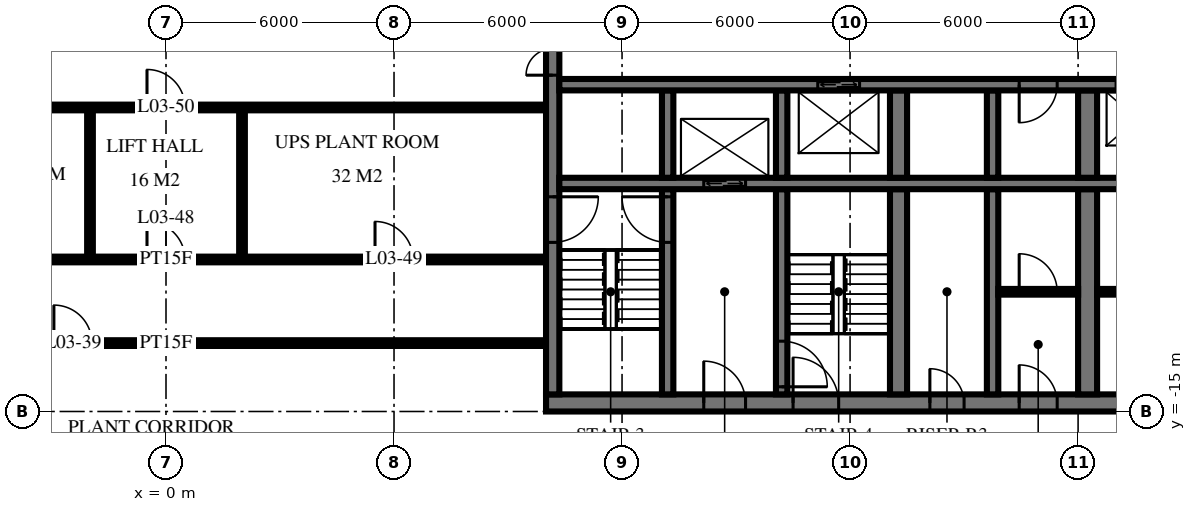
"""IFC4 building model, lengths in metres.
Left out: names, types, materials, properties, quantities, classifications, styles, units other than length and angle.
Written with IfcOpenShell. Run it as: python <this file> out.ifc"""

import sys

from ifc_helpers import new_model, si_unit, direction, frame, frame_2d, origin, place, context, subcontext, project, spatial, rectangle, extrude, element, fill, save


model = new_model("IFC4")
c1 = context("Model", 3, precision=1e-05, world=origin(), true_north=direction((0.0, 1.0)))
c2 = subcontext(c1, "Body", "Model", "MODEL_VIEW")
j1 = project(units=[si_unit("LENGTHUNIT", "METRE"), si_unit("PLANEANGLEUNIT", "RADIAN")], contexts=[c1])
p1 = place(None, origin())
s1 = spatial("IfcSite", under=j1, at=p1, CompositionType="ELEMENT")
p2 = place(p1, origin())
s2 = spatial("IfcBuilding", under=s1, at=p2, CompositionType="ELEMENT")
p3 = place(p2, frame((0.0, 0.0, 18.0)))
s3 = spatial("IfcBuildingStorey", under=s2, at=p3, CompositionType="ELEMENT", Elevation=18.0)
p4 = place(p3, frame((10.0, -14.775, 0.0), z_axis=(0.0, 0.0, 1.0), x_axis=(1.0, 0.0, 0.0)))
e1 = element("IfcWall", 1, at=p4, inside=s3, PredefinedType="SHEAR", context=c2, shape_type="SweptSolid", body=[
    extrude(rectangle(XDim=19.5, YDim=0.45, at=frame_2d((9.75, 0.0))), origin(), (0.0, 0.0, 1.0), 6.0),
])
p5 = place(p4, frame((6.5, 0.0, 0.0)))
e2 = element("IfcOpeningElement", 2, at=p5, cuts=e1, PredefinedType="OPENING", context=c2, shape_type="SweptSolid", body=[
    extrude(rectangle(XDim=1.2, YDim=2.1, at=frame_2d((0.6, 1.05))), frame((0.0, 0.235, 0.0), z_axis=(0.0, -1.0, 0.0), x_axis=(1.0, 0.0, 0.0)), (0.0, 0.0, 1.0), 0.47),
])
p6 = place(p4, frame((4.15, 0.0, 0.0)))
e3 = element("IfcOpeningElement", 3, at=p6, cuts=e1, PredefinedType="OPENING", context=c2, shape_type="SweptSolid", body=[
    extrude(rectangle(XDim=1.1, YDim=2.1, at=frame_2d((0.55, 1.05))), frame((0.0, 0.235, 0.0), z_axis=(0.0, -1.0, 0.0), x_axis=(1.0, 0.0, 0.0)), (0.0, 0.0, 1.0), 0.47),
])
p7 = place(p4, frame((10.1, 0.0, 0.0)))
e4 = element("IfcOpeningElement", 4, at=p7, cuts=e1, PredefinedType="OPENING", context=c2, shape_type="SweptSolid", body=[
    extrude(rectangle(XDim=0.9, YDim=2.1, at=frame_2d((0.45, 1.05))), frame((0.0, 0.235, 0.0), z_axis=(0.0, -1.0, 0.0), x_axis=(1.0, 0.0, 0.0)), (0.0, 0.0, 1.0), 0.47),
])
p8 = place(p4, frame((12.45, 0.0, 0.0)))
e5 = element("IfcOpeningElement", 5, at=p8, cuts=e1, PredefinedType="OPENING", context=c2, shape_type="SweptSolid", body=[
    extrude(rectangle(XDim=1.0, YDim=2.1, at=frame_2d((0.5, 1.05))), frame((0.0, 0.235, 0.0), z_axis=(0.0, -1.0, 0.0), x_axis=(1.0, 0.0, 0.0)), (0.0, 0.0, 1.0), 0.47),
])
p9 = place(p4, frame((16.25, 0.0, 0.0)))
e6 = element("IfcOpeningElement", 6, at=p9, cuts=e1, PredefinedType="OPENING", context=c2, shape_type="SweptSolid", body=[
    extrude(rectangle(XDim=1.0, YDim=2.1, at=frame_2d((0.5, 1.05))), frame((0.0, 0.235, 0.0), z_axis=(0.0, -1.0, 0.0), x_axis=(1.0, 0.0, 0.0)), (0.0, 0.0, 1.0), 0.47),
])
p10 = place(p3, frame((10.175, -14.55, 0.0), z_axis=(0.0, 0.0, 1.0), x_axis=(0.0, 1.0, 0.0)))
e7 = element("IfcWall", 7, at=p10, inside=s3, PredefinedType="SHEAR", context=c2, shape_type="SweptSolid", body=[
    extrude(rectangle(XDim=14.1, YDim=0.35, at=frame_2d((7.05, 0.0))), origin(), (0.0, 0.0, 1.0), 6.0),
])
p11 = place(p10, frame((8.4, 0.0, 0.0)))
e8 = element("IfcOpeningElement", 8, at=p11, cuts=e7, PredefinedType="OPENING", context=c2, shape_type="SweptSolid", body=[
    extrude(rectangle(XDim=1.4, YDim=2.4, at=frame_2d((0.7, 1.2))), frame((0.0, 0.185, 0.0), z_axis=(0.0, -1.0, 0.0), x_axis=(1.0, 0.0, 0.0)), (0.0, 0.0, 1.0), 0.37),
])
p12 = place(p10, frame((10.0, 0.0, 0.0)))
e9 = element("IfcOpeningElement", 9, at=p12, cuts=e7, PredefinedType="OPENING", context=c2, shape_type="SweptSolid", body=[
    extrude(rectangle(XDim=1.4, YDim=2.4, at=frame_2d((0.7, 1.2))), frame((0.0, 0.185, 0.0), z_axis=(0.0, -1.0, 0.0), x_axis=(1.0, 0.0, 0.0)), (0.0, 0.0, 1.0), 0.37),
])
p13 = place(p10, frame((4.0, 0.0, 0.0)))
e10 = element("IfcOpeningElement", 10, at=p13, cuts=e7, PredefinedType="OPENING", context=c2, shape_type="SweptSolid", body=[
    extrude(rectangle(XDim=1.2, YDim=2.1, at=frame_2d((0.6, 1.05))), frame((0.0, 0.185, 0.0), z_axis=(0.0, -1.0, 0.0), x_axis=(1.0, 0.0, 0.0)), (0.0, 0.0, 1.0), 0.37),
])
p14 = place(p3, frame((10.35, -6.4, 0.0), z_axis=(0.0, 0.0, 1.0), x_axis=(1.0, 0.0, 0.0)))
e11 = element("IfcWall", 11, at=p14, inside=s3, PredefinedType="SHEAR", context=c2, shape_type="SweptSolid", body=[
    extrude(rectangle(XDim=18.7, YDim=0.3, at=frame_2d((9.35, 0.0))), origin(), (0.0, 0.0, 1.0), 6.0),
])
p15 = place(p14, frame((14.65, 0.0, 0.0)))
e12 = element("IfcOpeningElement", 12, at=p15, cuts=e11, PredefinedType="OPENING", context=c2, shape_type="SweptSolid", body=[
    extrude(rectangle(XDim=1.1, YDim=2.1, at=frame_2d((0.55, 1.05))), frame((0.0, 0.16, 0.0), z_axis=(0.0, -1.0, 0.0), x_axis=(1.0, 0.0, 0.0)), (0.0, 0.0, 1.0), 0.32),
])
p16 = place(p14, frame((17.05, 0.0, 0.0)))
e13 = element("IfcOpeningElement", 13, at=p16, cuts=e11, PredefinedType="OPENING", context=c2, shape_type="SweptSolid", body=[
    extrude(rectangle(XDim=1.1, YDim=2.1, at=frame_2d((0.55, 1.05))), frame((0.0, 0.16, 0.0), z_axis=(0.0, -1.0, 0.0), x_axis=(1.0, 0.0, 0.0)), (0.0, 0.0, 1.0), 0.32),
])
p17 = place(p14, frame((6.8, 0.0, 0.0)))
e14 = element("IfcOpeningElement", 14, at=p17, cuts=e11, PredefinedType="OPENING", context=c2, shape_type="SweptSolid", body=[
    extrude(rectangle(XDim=1.1, YDim=2.1, at=frame_2d((0.55, 1.05))), frame((0.0, 0.16, 0.0), z_axis=(0.0, -1.0, 0.0), x_axis=(1.0, 0.0, 0.0)), (0.0, 0.0, 1.0), 0.32),
])
p18 = place(p14, frame((12.1, 0.0, 0.0)))
e15 = element("IfcOpeningElement", 15, at=p18, cuts=e11, PredefinedType="OPENING", context=c2, shape_type="SweptSolid", body=[
    extrude(rectangle(XDim=1.0, YDim=2.1, at=frame_2d((0.5, 1.05))), frame((0.0, 0.16, 0.0), z_axis=(0.0, -1.0, 0.0), x_axis=(1.0, 0.0, 0.0)), (0.0, 0.0, 1.0), 0.32),
])
p19 = place(p3, frame((10.35, -9.0, 0.0), z_axis=(0.0, 0.0, 1.0), x_axis=(1.0, 0.0, 0.0)))
e16 = element("IfcWall", 16, at=p19, inside=s3, PredefinedType="SHEAR", context=c2, shape_type="SweptSolid", body=[
    extrude(rectangle(XDim=18.7, YDim=0.3, at=frame_2d((9.35, 0.0))), origin(), (0.0, 0.0, 1.0), 6.0),
])
p20 = place(p19, frame((3.8, 0.0, 0.0)))
e17 = element("IfcOpeningElement", 17, at=p20, cuts=e16, PredefinedType="OPENING", context=c2, shape_type="SweptSolid", body=[
    extrude(rectangle(XDim=1.1, YDim=2.1, at=frame_2d((0.55, 1.05))), frame((0.0, 0.16, 0.0), z_axis=(0.0, -1.0, 0.0), x_axis=(1.0, 0.0, 0.0)), (0.0, 0.0, 1.0), 0.32),
])
p21 = place(p3, frame((13.2, -8.85, 0.0), z_axis=(0.0, 0.0, 1.0), x_axis=(0.0, 1.0, 0.0)))
e18 = element("IfcWall", 18, at=p21, inside=s3, PredefinedType="SHEAR", context=c2, shape_type="SweptSolid", body=[
    extrude(rectangle(XDim=2.3, YDim=0.3, at=frame_2d((1.15, 0.0))), origin(), (0.0, 0.0, 1.0), 6.0),
])
p22 = place(p3, frame((13.2, -14.55, 0.0), z_axis=(0.0, 0.0, 1.0), x_axis=(0.0, 1.0, 0.0)))
e19 = element("IfcWall", 19, at=p22, inside=s3, PredefinedType="SHEAR", context=c2, shape_type="SweptSolid", body=[
    extrude(rectangle(XDim=5.4, YDim=0.3, at=frame_2d((2.7, 0.0))), origin(), (0.0, 0.0, 1.0), 6.0),
])
p23 = place(p22, frame((4.0, 0.0, 0.0)))
e20 = element("IfcOpeningElement", 20, at=p23, cuts=e19, PredefinedType="OPENING", context=c2, shape_type="SweptSolid", body=[
    extrude(rectangle(XDim=1.2, YDim=2.1, at=frame_2d((0.6, 1.05))), frame((0.0, 0.16, 0.0), z_axis=(0.0, -1.0, 0.0), x_axis=(1.0, 0.0, 0.0)), (0.0, 0.0, 1.0), 0.32),
])
p24 = place(p3, frame((16.2, -8.85, 0.0), z_axis=(0.0, 0.0, 1.0), x_axis=(0.0, 1.0, 0.0)))
e21 = element("IfcWall", 21, at=p24, inside=s3, PredefinedType="SHEAR", context=c2, shape_type="SweptSolid", body=[
    extrude(rectangle(XDim=2.3, YDim=0.3, at=frame_2d((1.15, 0.0))), origin(), (0.0, 0.0, 1.0), 6.0),
])
p25 = place(p3, frame((16.2, -14.55, 0.0), z_axis=(0.0, 0.0, 1.0), x_axis=(0.0, 1.0, 0.0)))
e22 = element("IfcWall", 22, at=p25, inside=s3, PredefinedType="SHEAR", context=c2, shape_type="SweptSolid", body=[
    extrude(rectangle(XDim=5.4, YDim=0.3, at=frame_2d((2.7, 0.0))), origin(), (0.0, 0.0, 1.0), 6.0),
])
p26 = place(p25, frame((0.2, 0.0, 0.0)))
e23 = element("IfcOpeningElement", 23, at=p26, cuts=e22, PredefinedType="OPENING", context=c2, shape_type="SweptSolid", body=[
    extrude(rectangle(XDim=1.2, YDim=2.1, at=frame_2d((0.6, 1.05))), frame((0.0, 0.16, 0.0), z_axis=(0.0, -1.0, 0.0), x_axis=(1.0, 0.0, 0.0)), (0.0, 0.0, 1.0), 0.32),
])
p27 = place(p3, frame((19.275, -8.85, 0.0), z_axis=(0.0, 0.0, 1.0), x_axis=(0.0, 1.0, 0.0)))
e24 = element("IfcWall", 24, at=p27, inside=s3, PredefinedType="SHEAR", context=c2, shape_type="SweptSolid", body=[
    extrude(rectangle(XDim=2.3, YDim=0.45, at=frame_2d((1.15, 0.0))), origin(), (0.0, 0.0, 1.0), 6.0),
])
p28 = place(p3, frame((19.275, -14.55, 0.0), z_axis=(0.0, 0.0, 1.0), x_axis=(0.0, 1.0, 0.0)))
e25 = element("IfcWall", 25, at=p28, inside=s3, PredefinedType="SHEAR", context=c2, shape_type="SweptSolid", body=[
    extrude(rectangle(XDim=5.4, YDim=0.45, at=frame_2d((2.7, 0.0))), origin(), (0.0, 0.0, 1.0), 6.0),
])
p29 = place(p3, frame((21.75, -8.85, 0.0), z_axis=(0.0, 0.0, 1.0), x_axis=(0.0, 1.0, 0.0)))
e26 = element("IfcWall", 26, at=p29, inside=s3, PredefinedType="SHEAR", context=c2, shape_type="SweptSolid", body=[
    extrude(rectangle(XDim=2.3, YDim=0.3, at=frame_2d((1.15, 0.0))), origin(), (0.0, 0.0, 1.0), 6.0),
])
p30 = place(p3, frame((21.75, -14.55, 0.0), z_axis=(0.0, 0.0, 1.0), x_axis=(0.0, 1.0, 0.0)))
e27 = element("IfcWall", 27, at=p30, inside=s3, PredefinedType="SHEAR", context=c2, shape_type="SweptSolid", body=[
    extrude(rectangle(XDim=5.4, YDim=0.3, at=frame_2d((2.7, 0.0))), origin(), (0.0, 0.0, 1.0), 6.0),
])
p31 = place(p3, frame((24.25, -8.85, 0.0), z_axis=(0.0, 0.0, 1.0), x_axis=(0.0, 1.0, 0.0)))
e28 = element("IfcWall", 28, at=p31, inside=s3, PredefinedType="SHEAR", context=c2, shape_type="SweptSolid", body=[
    extrude(rectangle(XDim=2.3, YDim=0.5, at=frame_2d((1.15, 0.0))), origin(), (0.0, 0.0, 1.0), 6.0),
])
p32 = place(p3, frame((24.25, -14.55, 0.0), z_axis=(0.0, 0.0, 1.0), x_axis=(0.0, 1.0, 0.0)))
e29 = element("IfcWall", 29, at=p32, inside=s3, PredefinedType="SHEAR", context=c2, shape_type="SweptSolid", body=[
    extrude(rectangle(XDim=5.4, YDim=0.5, at=frame_2d((2.7, 0.0))), origin(), (0.0, 0.0, 1.0), 6.0),
])
p33 = place(p3, frame((21.9, -11.85, 0.0), z_axis=(0.0, 0.0, 1.0), x_axis=(1.0, 0.0, 0.0)))
e30 = element("IfcWall", 30, at=p33, inside=s3, PredefinedType="PARTITIONING", context=c2, shape_type="SweptSolid", body=[
    extrude(rectangle(XDim=2.1, YDim=0.15, at=frame_2d((1.05, 0.0))), origin(), (0.0, 0.0, 1.0), 5.7),
])
p34 = place(p33, frame((0.55, 0.0, 0.0)))
e31 = element("IfcOpeningElement", 31, at=p34, cuts=e30, PredefinedType="OPENING", context=c2, shape_type="SweptSolid", body=[
    extrude(rectangle(XDim=1.0, YDim=2.1, at=frame_2d((0.5, 1.05))), frame((0.0, 0.085, 0.0), z_axis=(0.0, -1.0, 0.0), x_axis=(1.0, 0.0, 0.0)), (0.0, 0.0, 1.0), 0.17),
])
p35 = place(p3, frame((24.5, -11.85, 0.0), z_axis=(0.0, 0.0, 1.0), x_axis=(1.0, 0.0, 0.0)))
e32 = element("IfcWall", 32, at=p35, inside=s3, PredefinedType="PARTITIONING", context=c2, shape_type="SweptSolid", body=[
    extrude(rectangle(XDim=4.5, YDim=0.15, at=frame_2d((2.25, 0.0))), origin(), (0.0, 0.0, 1.0), 5.7),
])
p36 = place(p35, frame((1.75, 0.0, 0.0)))
e33 = element("IfcOpeningElement", 33, at=p36, cuts=e32, PredefinedType="OPENING", context=c2, shape_type="SweptSolid", body=[
    extrude(rectangle(XDim=1.0, YDim=2.1, at=frame_2d((0.5, 1.05))), frame((0.0, 0.085, 0.0), z_axis=(0.0, -1.0, 0.0), x_axis=(1.0, 0.0, 0.0)), (0.0, 0.0, 1.0), 0.17),
])
for number, where, z_axis, x_axis in (
    (34, (2.0, -11.0, 0.0), (0.0, 0.0, 1.0), (0.0, 1.0, 0.0)),
    (35, (-2.0, -11.0, 0.0), (0.0, 0.0, 1.0), (0.0, 1.0, 0.0)),
):
    element("IfcWall", number, at=place(p3, frame(where, z_axis=z_axis, x_axis=x_axis)), inside=s3, PredefinedType="PARTITIONING", context=c2, shape_type="SweptSolid", body=[
        extrude(rectangle(XDim=4.0, YDim=0.15, at=frame_2d((2.0, 0.0))), origin(), (0.0, 0.0, 1.0), 5.55),
    ])
p37 = place(p3, frame((-9.95, -13.2, 0.0), z_axis=(0.0, 0.0, 1.0), x_axis=(1.0, 0.0, 0.0)))
e36 = element("IfcWall", 36, at=p37, inside=s3, PredefinedType="PARTITIONING", context=c2, shape_type="SweptSolid", body=[
    extrude(rectangle(XDim=19.9, YDim=0.15, at=frame_2d((9.95, 0.0))), origin(), (0.0, 0.0, 1.0), 5.55),
])
p38 = place(p37, frame((7.0, 0.0, 0.0)))
e37 = element("IfcOpeningElement", 37, at=p38, cuts=e36, PredefinedType="OPENING", context=c2, shape_type="SweptSolid", body=[
    extrude(rectangle(XDim=1.0, YDim=2.1, at=frame_2d((0.5, 1.05))), frame((0.0, 0.085, 0.0), z_axis=(0.0, -1.0, 0.0), x_axis=(1.0, 0.0, 0.0)), (0.0, 0.0, 1.0), 0.17),
])
p39 = place(p3, frame((-9.95, -11.0, 0.0), z_axis=(0.0, 0.0, 1.0), x_axis=(1.0, 0.0, 0.0)))
e38 = element("IfcWall", 38, at=p39, inside=s3, PredefinedType="PARTITIONING", context=c2, shape_type="SweptSolid", body=[
    extrude(rectangle(XDim=19.9, YDim=0.15, at=frame_2d((9.95, 0.0))), origin(), (0.0, 0.0, 1.0), 5.55),
])
p40 = place(p39, frame((9.45, 0.0, 0.0)))
e39 = element("IfcOpeningElement", 39, at=p40, cuts=e38, PredefinedType="OPENING", context=c2, shape_type="SweptSolid", body=[
    extrude(rectangle(XDim=1.0, YDim=2.1, at=frame_2d((0.5, 1.05))), frame((0.0, 0.085, 0.0), z_axis=(0.0, -1.0, 0.0), x_axis=(1.0, 0.0, 0.0)), (0.0, 0.0, 1.0), 0.17),
])
p41 = place(p39, frame((15.45, 0.0, 0.0)))
e40 = element("IfcOpeningElement", 40, at=p41, cuts=e38, PredefinedType="OPENING", context=c2, shape_type="SweptSolid", body=[
    extrude(rectangle(XDim=1.0, YDim=2.1, at=frame_2d((0.5, 1.05))), frame((0.0, 0.085, 0.0), z_axis=(0.0, -1.0, 0.0), x_axis=(1.0, 0.0, 0.0)), (0.0, 0.0, 1.0), 0.17),
])
p42 = place(p3, frame((-9.95, -7.0, 0.0), z_axis=(0.0, 0.0, 1.0), x_axis=(1.0, 0.0, 0.0)))
e41 = element("IfcWall", 41, at=p42, inside=s3, PredefinedType="PARTITIONING", context=c2, shape_type="SweptSolid", body=[
    extrude(rectangle(XDim=19.9, YDim=0.15, at=frame_2d((9.95, 0.0))), origin(), (0.0, 0.0, 1.0), 5.55),
])
p43 = place(p42, frame((9.45, 0.0, 0.0)))
e42 = element("IfcOpeningElement", 42, at=p43, cuts=e41, PredefinedType="OPENING", context=c2, shape_type="SweptSolid", body=[
    extrude(rectangle(XDim=1.0, YDim=2.1, at=frame_2d((0.5, 1.05))), frame((0.0, 0.085, 0.0), z_axis=(0.0, -1.0, 0.0), x_axis=(1.0, 0.0, 0.0)), (0.0, 0.0, 1.0), 0.17),
])
p44 = place(p42, frame((2.0, 0.0, 0.0)))
e43 = element("IfcOpeningElement", 43, at=p44, cuts=e41, PredefinedType="OPENING", context=c2, shape_type="SweptSolid", body=[
    extrude(rectangle(XDim=1.0, YDim=2.1, at=frame_2d((0.5, 1.05))), frame((0.0, 0.085, 0.0), z_axis=(0.0, -1.0, 0.0), x_axis=(1.0, 0.0, 0.0)), (0.0, 0.0, 1.0), 0.17),
])
p45 = place(p20, origin())
e44 = element("IfcDoor", 44, at=p45, inside=s3, OperationType="DOUBLE_DOOR_SLIDING", PredefinedType="USERDEFINED", context=c2, shape_type="SweptSolid", body=[
    extrude(rectangle(XDim=1.1, YDim=2.1, at=frame_2d((0.55, 1.05))), frame((0.0, 0.025, 0.0), z_axis=(0.0, -1.0, 0.0), x_axis=(1.0, 0.0, 0.0)), (0.0, 0.0, 1.0), 0.05),
])
fill(e17, e44)
p46 = place(p17, origin())
e45 = element("IfcDoor", 45, at=p46, inside=s3, OperationType="DOUBLE_DOOR_SLIDING", PredefinedType="USERDEFINED", context=c2, shape_type="SweptSolid", body=[
    extrude(rectangle(XDim=1.1, YDim=2.1, at=frame_2d((0.55, 1.05))), frame((0.0, 0.025, 0.0), z_axis=(0.0, -1.0, 0.0), x_axis=(1.0, 0.0, 0.0)), (0.0, 0.0, 1.0), 0.05),
])
fill(e14, e45)
p47 = place(p11, origin())
e46 = element("IfcDoor", 46, at=p47, inside=s3, OperationType="DOUBLE_DOOR_SINGLE_SWING", PredefinedType="DOOR", context=c2, shape_type="SweptSolid", body=[
    extrude(rectangle(XDim=1.4, YDim=2.4, at=frame_2d((0.7, 1.2))), frame((0.0, 0.025, 0.0), z_axis=(0.0, -1.0, 0.0), x_axis=(1.0, 0.0, 0.0)), (0.0, 0.0, 1.0), 0.05),
])
fill(e8, e46)
p48 = place(p13, frame((0.6, 0.0, 0.0), z_axis=(0.0, 0.0, 1.0), x_axis=(-1.0, 0.0, 0.0)))
e47 = element("IfcDoor", 47, at=p48, inside=s3, OperationType="SINGLE_SWING_RIGHT", PredefinedType="DOOR", context=c2, shape_type="SweptSolid", body=[
    extrude(rectangle(XDim=1.2, YDim=2.1, at=frame_2d((0.0, 1.05))), frame((0.0, -0.025, 0.0), z_axis=(0.0, 1.0, 0.0), x_axis=(-1.0, 0.0, 0.0)), (0.0, 0.0, 1.0), 0.05),
])
fill(e10, e47)
p49 = place(p5, origin())
e48 = element("IfcDoor", 48, at=p49, inside=s3, OperationType="SINGLE_SWING_RIGHT", PredefinedType="DOOR", context=c2, shape_type="SweptSolid", body=[
    extrude(rectangle(XDim=1.2, YDim=2.1, at=frame_2d((0.6, 1.05))), frame((0.0, 0.025, 0.0), z_axis=(0.0, -1.0, 0.0), x_axis=(1.0, 0.0, 0.0)), (0.0, 0.0, 1.0), 0.05),
])
fill(e2, e48)
p50 = place(p6, origin())
e49 = element("IfcDoor", 49, at=p50, inside=s3, OperationType="SINGLE_SWING_RIGHT", PredefinedType="DOOR", context=c2, shape_type="SweptSolid", body=[
    extrude(rectangle(XDim=1.1, YDim=2.1, at=frame_2d((0.55, 1.05))), frame((0.0, 0.025, 0.0), z_axis=(0.0, -1.0, 0.0), x_axis=(1.0, 0.0, 0.0)), (0.0, 0.0, 1.0), 0.05),
])
fill(e3, e49)
p51 = place(p7, origin())
e50 = element("IfcDoor", 50, at=p51, inside=s3, OperationType="SINGLE_SWING_RIGHT", PredefinedType="DOOR", context=c2, shape_type="SweptSolid", body=[
    extrude(rectangle(XDim=0.9, YDim=2.1, at=frame_2d((0.45, 1.05))), frame((0.0, 0.025, 0.0), z_axis=(0.0, -1.0, 0.0), x_axis=(1.0, 0.0, 0.0)), (0.0, 0.0, 1.0), 0.05),
])
fill(e4, e50)
p52 = place(p8, origin())
e51 = element("IfcDoor", 51, at=p52, inside=s3, OperationType="SINGLE_SWING_RIGHT", PredefinedType="DOOR", context=c2, shape_type="SweptSolid", body=[
    extrude(rectangle(XDim=1.0, YDim=2.1, at=frame_2d((0.5, 1.05))), frame((0.0, 0.025, 0.0), z_axis=(0.0, -1.0, 0.0), x_axis=(1.0, 0.0, 0.0)), (0.0, 0.0, 1.0), 0.05),
])
fill(e5, e51)
p53 = place(p18, frame((0.5, 0.0, 0.0), z_axis=(0.0, 0.0, 1.0), x_axis=(-1.0, 0.0, 0.0)))
e52 = element("IfcDoor", 52, at=p53, inside=s3, OperationType="SINGLE_SWING_LEFT", PredefinedType="DOOR", context=c2, shape_type="SweptSolid", body=[
    extrude(rectangle(XDim=1.0, YDim=2.1, at=frame_2d((0.0, 1.05))), frame((0.0, -0.025, 0.0), z_axis=(0.0, 1.0, 0.0), x_axis=(-1.0, 0.0, 0.0)), (0.0, 0.0, 1.0), 0.05),
])
fill(e15, e52)
p54 = place(p23, origin())
e53 = element("IfcDoor", 53, at=p54, inside=s3, OperationType="SINGLE_SWING_LEFT", PredefinedType="DOOR", context=c2, shape_type="SweptSolid", body=[
    extrude(rectangle(XDim=1.2, YDim=2.1, at=frame_2d((0.6, 1.05))), frame((0.0, 0.025, 0.0), z_axis=(0.0, -1.0, 0.0), x_axis=(1.0, 0.0, 0.0)), (0.0, 0.0, 1.0), 0.05),
])
fill(e20, e53)
p55 = place(p26, frame((0.6, 0.0, 0.0), z_axis=(0.0, 0.0, 1.0), x_axis=(-1.0, 0.0, 0.0)))
e54 = element("IfcDoor", 54, at=p55, inside=s3, OperationType="SINGLE_SWING_LEFT", PredefinedType="DOOR", context=c2, shape_type="SweptSolid", body=[
    extrude(rectangle(XDim=1.2, YDim=2.1, at=frame_2d((0.0, 1.05))), frame((0.0, -0.025, 0.0), z_axis=(0.0, 1.0, 0.0), x_axis=(-1.0, 0.0, 0.0)), (0.0, 0.0, 1.0), 0.05),
])
fill(e23, e54)
p56 = place(p34, origin())
e55 = element("IfcDoor", 55, at=p56, inside=s3, OperationType="SINGLE_SWING_RIGHT", PredefinedType="DOOR", context=c2, shape_type="SweptSolid", body=[
    extrude(rectangle(XDim=1.0, YDim=2.1, at=frame_2d((0.5, 1.05))), frame((0.0, 0.025, 0.0), z_axis=(0.0, -1.0, 0.0), x_axis=(1.0, 0.0, 0.0)), (0.0, 0.0, 1.0), 0.05),
])
fill(e31, e55)
p57 = place(p38, origin())
e56 = element("IfcDoor", 56, at=p57, inside=s3, OperationType="SINGLE_SWING_RIGHT", PredefinedType="DOOR", context=c2, shape_type="SweptSolid", body=[
    extrude(rectangle(XDim=1.0, YDim=2.1, at=frame_2d((0.5, 1.05))), frame((0.0, 0.025, 0.0), z_axis=(0.0, -1.0, 0.0), x_axis=(1.0, 0.0, 0.0)), (0.0, 0.0, 1.0), 0.05),
])
fill(e37, e56)
p58 = place(p40, origin())
e57 = element("IfcDoor", 57, at=p58, inside=s3, OperationType="SINGLE_SWING_RIGHT", PredefinedType="DOOR", context=c2, shape_type="SweptSolid", body=[
    extrude(rectangle(XDim=1.0, YDim=2.1, at=frame_2d((0.5, 1.05))), frame((0.0, 0.025, 0.0), z_axis=(0.0, -1.0, 0.0), x_axis=(1.0, 0.0, 0.0)), (0.0, 0.0, 1.0), 0.05),
])
fill(e39, e57)
p59 = place(p41, origin())
e58 = element("IfcDoor", 58, at=p59, inside=s3, OperationType="SINGLE_SWING_RIGHT", PredefinedType="DOOR", context=c2, shape_type="SweptSolid", body=[
    extrude(rectangle(XDim=1.0, YDim=2.1, at=frame_2d((0.5, 1.05))), frame((0.0, 0.025, 0.0), z_axis=(0.0, -1.0, 0.0), x_axis=(1.0, 0.0, 0.0)), (0.0, 0.0, 1.0), 0.05),
])
fill(e40, e58)
p60 = place(p43, origin())
e59 = element("IfcDoor", 59, at=p60, inside=s3, OperationType="SINGLE_SWING_RIGHT", PredefinedType="DOOR", context=c2, shape_type="SweptSolid", body=[
    extrude(rectangle(XDim=1.0, YDim=2.1, at=frame_2d((0.5, 1.05))), frame((0.0, 0.025, 0.0), z_axis=(0.0, -1.0, 0.0), x_axis=(1.0, 0.0, 0.0)), (0.0, 0.0, 1.0), 0.05),
])
fill(e42, e59)
save(model, sys.argv[1])
